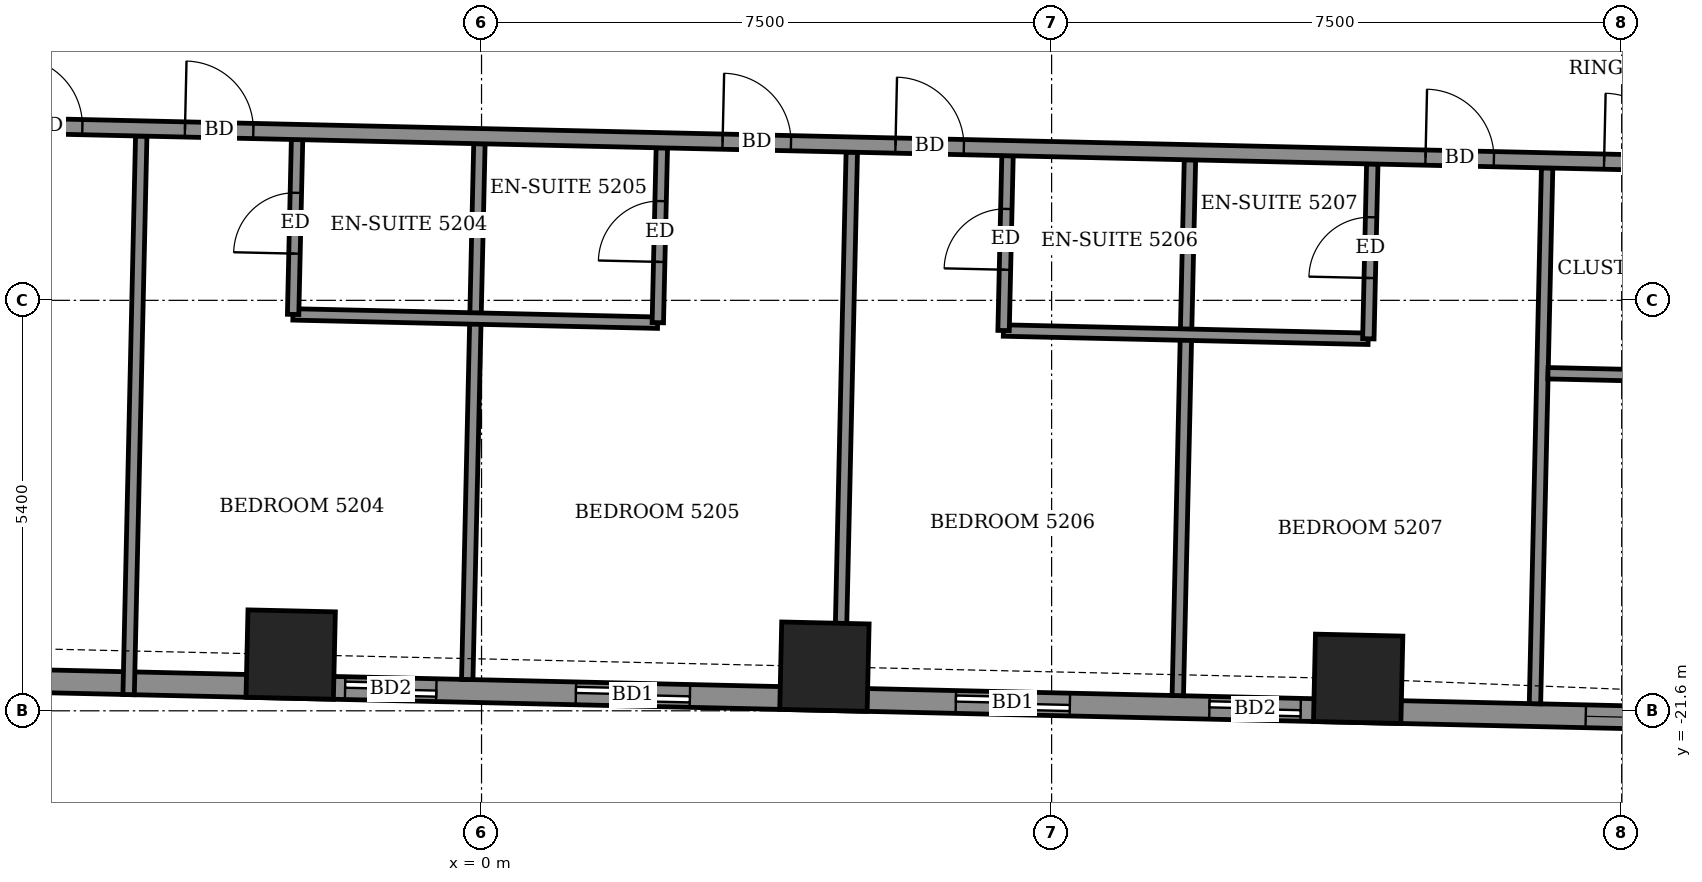
"""IFC4 building model, lengths in metres.
Left out: names, types, materials, properties, quantities, classifications, styles, units other than length and angle.
Written with IfcOpenShell. Run it as: python <this file> out.ifc"""

import sys

from ifc_helpers import new_model, si_unit, direction, frame, frame_2d, origin, origin_2d, place, context, subcontext, project, spatial, rectangle, extrude, element, fill, save


model = new_model("IFC4")
c1 = context("Model", 3, precision=1e-05, world=origin(), true_north=direction((0.0, 1.0)))
c2 = subcontext(c1, "Body", "Model", "MODEL_VIEW")
j1 = project(units=[si_unit("LENGTHUNIT", "METRE"), si_unit("PLANEANGLEUNIT", "RADIAN")], contexts=[c1])
p1 = place(None, origin())
s1 = spatial("IfcSite", under=j1, at=p1, CompositionType="ELEMENT")
p2 = place(p1, origin())
s2 = spatial("IfcBuilding", under=s1, at=p2, CompositionType="ELEMENT")
p3 = place(p2, frame((0.0, 0.0, 205.1)))
s3 = spatial("IfcBuildingStorey", under=s2, at=p3, CompositionType="ELEMENT", Elevation=205.1)
for number, where, z_axis, x_axis in (
    (1, (-2.511, -20.86, -0.55), (0.0, 0.0, 1.0), (1.0, -0.023, 0.0)),
    (2, (4.511, -21.019, -0.55), (0.0, 0.0, 1.0), (1.0, -0.023, 0.0)),
    (3, (11.533, -21.179, -0.55), (0.0, 0.0, 1.0), (1.0, -0.023, 0.0)),
):
    element("IfcColumn", number, at=place(p3, frame(where, z_axis=z_axis, x_axis=x_axis)), inside=s3, PredefinedType="COLUMN", context=c2, shape_type="SweptSolid", body=[
        extrude(rectangle(XDim=1.15, YDim=1.15, at=origin_2d()), origin(), (0.0, 0.0, 1.0), 3.6),
    ])
p4 = place(p3, frame((-23.437, -20.81, 0.0), z_axis=(0.0, 0.0, 1.0), x_axis=(0.999742269115, -0.022702320244, 0.0)))
e4 = element("IfcWall", 4, at=p4, inside=s3, PredefinedType="SOLIDWALL", context=c2, shape_type="SweptSolid", body=[
    extrude(rectangle(XDim=41.844, YDim=0.3, at=frame_2d((20.922, 0.0))), origin(), (0.0, 0.0, 1.0), 2.55),
])
p5 = place(p4, frame((1.899, 0.0, 0.0)))
e5 = element("IfcOpeningElement", 5, at=p5, cuts=e4, PredefinedType="OPENING", context=c2, shape_type="SweptSolid", body=[
    extrude(rectangle(XDim=1.5, YDim=2.4, at=frame_2d((0.75, 1.2))), frame((0.0, 0.16, 0.0), z_axis=(0.0, -1.0, 0.0), x_axis=(1.0, 0.0, 0.0)), (0.0, 0.0, 1.0), 0.32),
])
p6 = place(p4, frame((7.575, 0.0, 0.0)))
e6 = element("IfcOpeningElement", 6, at=p6, cuts=e4, PredefinedType="OPENING", context=c2, shape_type="SweptSolid", body=[
    extrude(rectangle(XDim=1.2, YDim=2.4, at=frame_2d((0.6, 1.2))), frame((0.0, 0.16, 0.0), z_axis=(0.0, -1.0, 0.0), x_axis=(1.0, 0.0, 0.0)), (0.0, 0.0, 1.0), 0.32),
])
p7 = place(p4, frame((10.612, 0.0, 0.0)))
e7 = element("IfcOpeningElement", 7, at=p7, cuts=e4, PredefinedType="OPENING", context=c2, shape_type="SweptSolid", body=[
    extrude(rectangle(XDim=1.5, YDim=2.4, at=frame_2d((0.75, 1.2))), frame((0.0, 0.16, 0.0), z_axis=(0.0, -1.0, 0.0), x_axis=(1.0, 0.0, 0.0)), (0.0, 0.0, 1.0), 0.32),
])
p8 = place(p4, frame((15.762, 0.0, 0.0)))
e8 = element("IfcOpeningElement", 8, at=p8, cuts=e4, PredefinedType="OPENING", context=c2, shape_type="SweptSolid", body=[
    extrude(rectangle(XDim=1.5, YDim=2.4, at=frame_2d((0.75, 1.2))), frame((0.0, 0.16, 0.0), z_axis=(0.0, -1.0, 0.0), x_axis=(1.0, 0.0, 0.0)), (0.0, 0.0, 1.0), 0.32),
])
p9 = place(p4, frame((21.648, 0.0, 0.0)))
e9 = element("IfcOpeningElement", 9, at=p9, cuts=e4, PredefinedType="OPENING", context=c2, shape_type="SweptSolid", body=[
    extrude(rectangle(XDim=1.2, YDim=2.4, at=frame_2d((0.6, 1.2))), frame((0.0, 0.16, 0.0), z_axis=(0.0, -1.0, 0.0), x_axis=(1.0, 0.0, 0.0)), (0.0, 0.0, 1.0), 0.32),
])
p10 = place(p4, frame((24.685, 0.0, 0.0)))
e10 = element("IfcOpeningElement", 10, at=p10, cuts=e4, PredefinedType="OPENING", context=c2, shape_type="SweptSolid", body=[
    extrude(rectangle(XDim=1.5, YDim=2.4, at=frame_2d((0.75, 1.2))), frame((0.0, 0.16, 0.0), z_axis=(0.0, -1.0, 0.0), x_axis=(1.0, 0.0, 0.0)), (0.0, 0.0, 1.0), 0.32),
])
p11 = place(p4, frame((29.685, 0.0, 0.0)))
e11 = element("IfcOpeningElement", 11, at=p11, cuts=e4, PredefinedType="OPENING", context=c2, shape_type="SweptSolid", body=[
    extrude(rectangle(XDim=1.5, YDim=2.4, at=frame_2d((0.75, 1.2))), frame((0.0, 0.16, 0.0), z_axis=(0.0, -1.0, 0.0), x_axis=(1.0, 0.0, 0.0)), (0.0, 0.0, 1.0), 0.32),
])
p12 = place(p4, frame((33.022, 0.0, 0.0)))
e12 = element("IfcOpeningElement", 12, at=p12, cuts=e4, PredefinedType="OPENING", context=c2, shape_type="SweptSolid", body=[
    extrude(rectangle(XDim=1.2, YDim=2.4, at=frame_2d((0.6, 1.2))), frame((0.0, 0.16, 0.0), z_axis=(0.0, -1.0, 0.0), x_axis=(1.0, 0.0, 0.0)), (0.0, 0.0, 1.0), 0.32),
])
p13 = place(p4, frame((37.974, 0.0, 0.9)))
e13 = element("IfcOpeningElement", 13, at=p13, cuts=e4, PredefinedType="OPENING", context=c2, shape_type="SweptSolid", body=[
    extrude(rectangle(XDim=2.4, YDim=1.5, at=frame_2d((1.2, 0.75))), frame((0.0, 0.16, 0.0), z_axis=(0.0, -1.0, 0.0), x_axis=(1.0, 0.0, 0.0)), (0.0, 0.0, 1.0), 0.32),
])
p14 = place(p3, frame((-4.643, -21.387, 0.0), z_axis=(0.0, 0.0, 1.0), x_axis=(0.022587849492, 0.99974486198, 0.0)))
e14 = element("IfcWall", 14, at=p14, inside=s3, PredefinedType="PARTITIONING", context=c2, shape_type="SweptSolid", body=[
    extrude(rectangle(XDim=7.35, YDim=0.15, at=frame_2d((3.675, 0.0))), origin(), (0.0, 0.0, 1.0), 2.55),
])
p15 = place(p3, frame((-0.188, -21.188, 0.0), z_axis=(0.0, 0.0, 1.0), x_axis=(0.022682859663, 0.99974271084, 0.0)))
e15 = element("IfcWall", 15, at=p15, inside=s3, PredefinedType="PARTITIONING", context=c2, shape_type="SweptSolid", body=[
    extrude(rectangle(XDim=7.05, YDim=0.15, at=frame_2d((3.525, 0.0))), origin(), (0.0, 0.0, 1.0), 2.55),
])
p16 = place(p3, frame((4.711, -21.299, 0.0), z_axis=(0.0, 0.0, 1.0), x_axis=(0.022717472124, 0.999741924929, 0.0)))
e16 = element("IfcWall", 16, at=p16, inside=s3, PredefinedType="PARTITIONING", context=c2, shape_type="SweptSolid", body=[
    extrude(rectangle(XDim=7.05, YDim=0.15, at=frame_2d((3.525, 0.0))), origin(), (0.0, 0.0, 1.0), 3.05),
])
p17 = place(p3, frame((9.16, -21.4, 0.0), z_axis=(0.0, 0.0, 1.0), x_axis=(0.022718258661, 0.999741907056, 0.0)))
e17 = element("IfcWall", 17, at=p17, inside=s3, PredefinedType="PARTITIONING", context=c2, shape_type="SweptSolid", body=[
    extrude(rectangle(XDim=7.05, YDim=0.15, at=frame_2d((3.525, 0.0))), origin(), (0.0, 0.0, 1.0), 2.55),
])
p18 = place(p3, frame((13.859, -21.507, 0.0), z_axis=(0.0, 0.0, 1.0), x_axis=(0.022714326521, 0.999741996402, 0.0)))
e18 = element("IfcWall", 18, at=p18, inside=s3, PredefinedType="PARTITIONING", context=c2, shape_type="SweptSolid", body=[
    extrude(rectangle(XDim=7.051, YDim=0.15, at=frame_2d((3.525, 0.0))), origin(), (0.0, 0.0, 1.0), 2.55),
])
p19 = place(p3, frame((14.03, -17.159, 0.0), z_axis=(0.0, 0.0, 1.0), x_axis=(0.999740478815, -0.022781023197, 0.0)))
e19 = element("IfcWall", 19, at=p19, inside=s3, PredefinedType="PARTITIONING", context=c2, shape_type="SweptSolid", body=[
    extrude(rectangle(XDim=2.325, YDim=0.15, at=frame_2d((1.163, 0.0))), origin(), (0.0, 0.0, 1.0), 3.05),
])
p20 = place(p3, frame((-2.481, -16.385, 0.0), z_axis=(0.0, 0.0, 1.0), x_axis=(0.999742570398, -0.022689048768, 0.0)))
e20 = element("IfcWall", 20, at=p20, inside=s3, PredefinedType="PARTITIONING", context=c2, shape_type="SweptSolid", body=[
    extrude(rectangle(XDim=4.799, YDim=0.15, at=frame_2d((2.399, 0.0))), origin(), (0.0, 0.0, 1.0), 3.05),
])
p21 = place(p3, frame((-2.479, -16.385, 0.0), z_axis=(0.0, 0.0, 1.0), x_axis=(0.022603288534, 0.999744513037, 0.0)))
e21 = element("IfcWall", 21, at=p21, inside=s3, PredefinedType="PARTITIONING", context=c2, shape_type="SweptSolid", body=[
    extrude(rectangle(XDim=2.301, YDim=0.15, at=frame_2d((1.15, 0.0))), origin(), (0.0, 0.0, 1.0), 3.05),
])
p22 = place(p21, frame((0.8, 0.0, 0.0)))
e22 = element("IfcOpeningElement", 22, at=p22, cuts=e21, PredefinedType="OPENING", context=c2, shape_type="SweptSolid", body=[
    extrude(rectangle(XDim=0.8, YDim=2.1, at=frame_2d((0.4, 1.05))), frame((0.0, 0.085, 0.0), z_axis=(0.0, -1.0, 0.0), x_axis=(1.0, 0.0, 0.0)), (0.0, 0.0, 1.0), 0.17),
])
p23 = place(p3, frame((2.319, -16.494, 0.0), z_axis=(0.0, 0.0, 1.0), x_axis=(0.023029983665, 0.999734774754, 0.0)))
e23 = element("IfcWall", 23, at=p23, inside=s3, PredefinedType="PARTITIONING", context=c2, shape_type="SweptSolid", body=[
    extrude(rectangle(XDim=2.3, YDim=0.15, at=frame_2d((1.15, 0.0))), origin(), (0.0, 0.0, 1.0), 3.05),
])
p24 = place(p23, frame((0.8, 0.0, 0.0)))
e24 = element("IfcOpeningElement", 24, at=p24, cuts=e23, PredefinedType="OPENING", context=c2, shape_type="SweptSolid", body=[
    extrude(rectangle(XDim=0.8, YDim=2.1, at=frame_2d((0.4, 1.05))), frame((0.0, 0.085, 0.0), z_axis=(0.0, -1.0, 0.0), x_axis=(1.0, 0.0, 0.0)), (0.0, 0.0, 1.0), 0.17),
])
p25 = place(p3, frame((6.866, -16.597, 0.0), z_axis=(0.0, 0.0, 1.0), x_axis=(0.99974154664, -0.022734113616, 0.0)))
e25 = element("IfcWall", 25, at=p25, inside=s3, PredefinedType="PARTITIONING", context=c2, shape_type="SweptSolid", body=[
    extrude(rectangle(XDim=4.8, YDim=0.15, at=frame_2d((2.4, 0.0))), origin(), (0.0, 0.0, 1.0), 3.05),
])
p26 = place(p3, frame((6.868, -16.597, 0.0), z_axis=(0.0, 0.0, 1.0), x_axis=(0.022605686808, 0.999744458811, 0.0)))
e26 = element("IfcWall", 26, at=p26, inside=s3, PredefinedType="PARTITIONING", context=c2, shape_type="SweptSolid", body=[
    extrude(rectangle(XDim=2.3, YDim=0.15, at=frame_2d((1.15, 0.0))), origin(), (0.0, 0.0, 1.0), 3.05),
])
p27 = place(p26, frame((0.8, 0.0, 0.0)))
e27 = element("IfcOpeningElement", 27, at=p27, cuts=e26, PredefinedType="OPENING", context=c2, shape_type="SweptSolid", body=[
    extrude(rectangle(XDim=0.8, YDim=2.1, at=frame_2d((0.4, 1.05))), frame((0.0, 0.085, 0.0), z_axis=(0.0, -1.0, 0.0), x_axis=(1.0, 0.0, 0.0)), (0.0, 0.0, 1.0), 0.17),
])
p28 = place(p3, frame((11.667, -16.706, 0.0), z_axis=(0.0, 0.0, 1.0), x_axis=(0.022603288534, 0.999744513037, 0.0)))
e28 = element("IfcWall", 28, at=p28, inside=s3, PredefinedType="PARTITIONING", context=c2, shape_type="SweptSolid", body=[
    extrude(rectangle(XDim=2.301, YDim=0.15, at=frame_2d((1.15, 0.0))), origin(), (0.0, 0.0, 1.0), 3.05),
])
p29 = place(p28, frame((0.8, 0.0, 0.0)))
e29 = element("IfcOpeningElement", 29, at=p29, cuts=e28, PredefinedType="OPENING", context=c2, shape_type="SweptSolid", body=[
    extrude(rectangle(XDim=0.8, YDim=2.1, at=frame_2d((0.4, 1.05))), frame((0.0, 0.085, 0.0), z_axis=(0.0, -1.0, 0.0), x_axis=(1.0, 0.0, 0.0)), (0.0, 0.0, 1.0), 0.17),
])
p30 = place(p3, frame((-26.421, -13.441, 0.0), z_axis=(0.0, 0.0, 1.0), x_axis=(0.999742754064, -0.022680954485, 0.0)))
e30 = element("IfcWall", 30, at=p30, inside=s3, PredefinedType="PARTITIONING", context=c2, shape_type="SweptSolid", body=[
    extrude(rectangle(XDim=48.945, YDim=0.2, at=frame_2d((24.472, 0.0))), origin(), (0.0, 0.0, 1.0), 3.05),
])
p31 = place(p30, frame((1.375, 0.0, 0.0)))
e31 = element("IfcOpeningElement", 31, at=p31, cuts=e30, PredefinedType="OPENING", context=c2, shape_type="SweptSolid", body=[
    extrude(rectangle(XDim=1.0, YDim=2.1, at=frame_2d((0.5, 1.05))), frame((0.0, 0.11, 0.0), z_axis=(0.0, -1.0, 0.0), x_axis=(1.0, 0.0, 0.0)), (0.0, 0.0, 1.0), 0.22),
])
p32 = place(p30, frame((6.0, 0.0, 0.0)))
e32 = element("IfcOpeningElement", 32, at=p32, cuts=e30, PredefinedType="OPENING", context=c2, shape_type="SweptSolid", body=[
    extrude(rectangle(XDim=0.9, YDim=2.1, at=frame_2d((0.45, 1.05))), frame((0.0, 0.11, 0.0), z_axis=(0.0, -1.0, 0.0), x_axis=(1.0, 0.0, 0.0)), (0.0, 0.0, 1.0), 0.22),
])
p33 = place(p30, frame((10.775, 0.0, 0.0)))
e33 = element("IfcOpeningElement", 33, at=p33, cuts=e30, PredefinedType="OPENING", context=c2, shape_type="SweptSolid", body=[
    extrude(rectangle(XDim=0.9, YDim=2.1, at=frame_2d((0.45, 1.05))), frame((0.0, 0.11, 0.0), z_axis=(0.0, -1.0, 0.0), x_axis=(1.0, 0.0, 0.0)), (0.0, 0.0, 1.0), 0.22),
])
p34 = place(p30, frame((13.05, 0.0, 0.0)))
e34 = element("IfcOpeningElement", 34, at=p34, cuts=e30, PredefinedType="OPENING", context=c2, shape_type="SweptSolid", body=[
    extrude(rectangle(XDim=0.9, YDim=2.1, at=frame_2d((0.45, 1.05))), frame((0.0, 0.11, 0.0), z_axis=(0.0, -1.0, 0.0), x_axis=(1.0, 0.0, 0.0)), (0.0, 0.0, 1.0), 0.22),
])
p35 = place(p30, frame((20.275, 0.0, 0.0)))
e35 = element("IfcOpeningElement", 35, at=p35, cuts=e30, PredefinedType="OPENING", context=c2, shape_type="SweptSolid", body=[
    extrude(rectangle(XDim=0.9, YDim=2.1, at=frame_2d((0.45, 1.05))), frame((0.0, 0.11, 0.0), z_axis=(0.0, -1.0, 0.0), x_axis=(1.0, 0.0, 0.0)), (0.0, 0.0, 1.0), 0.22),
])
p36 = place(p30, frame((22.525, 0.0, 0.0)))
e36 = element("IfcOpeningElement", 36, at=p36, cuts=e30, PredefinedType="OPENING", context=c2, shape_type="SweptSolid", body=[
    extrude(rectangle(XDim=0.9, YDim=2.1, at=frame_2d((0.45, 1.05))), frame((0.0, 0.11, 0.0), z_axis=(0.0, -1.0, 0.0), x_axis=(1.0, 0.0, 0.0)), (0.0, 0.0, 1.0), 0.22),
])
p37 = place(p30, frame((29.6, 0.0, 0.0)))
e37 = element("IfcOpeningElement", 37, at=p37, cuts=e30, PredefinedType="OPENING", context=c2, shape_type="SweptSolid", body=[
    extrude(rectangle(XDim=0.9, YDim=2.1, at=frame_2d((0.45, 1.05))), frame((0.0, 0.11, 0.0), z_axis=(0.0, -1.0, 0.0), x_axis=(1.0, 0.0, 0.0)), (0.0, 0.0, 1.0), 0.22),
])
p38 = place(p30, frame((31.875, 0.0, 0.0)))
e38 = element("IfcOpeningElement", 38, at=p38, cuts=e30, PredefinedType="OPENING", context=c2, shape_type="SweptSolid", body=[
    extrude(rectangle(XDim=0.9, YDim=2.1, at=frame_2d((0.45, 1.05))), frame((0.0, 0.11, 0.0), z_axis=(0.0, -1.0, 0.0), x_axis=(1.0, 0.0, 0.0)), (0.0, 0.0, 1.0), 0.22),
])
p39 = place(p30, frame((38.85, 0.0, 0.0)))
e39 = element("IfcOpeningElement", 39, at=p39, cuts=e30, PredefinedType="OPENING", context=c2, shape_type="SweptSolid", body=[
    extrude(rectangle(XDim=0.9, YDim=2.1, at=frame_2d((0.45, 1.05))), frame((0.0, 0.11, 0.0), z_axis=(0.0, -1.0, 0.0), x_axis=(1.0, 0.0, 0.0)), (0.0, 0.0, 1.0), 0.22),
])
p40 = place(p30, frame((46.097, 0.0, 0.0)))
e40 = element("IfcOpeningElement", 40, at=p40, cuts=e30, PredefinedType="OPENING", context=c2, shape_type="SweptSolid", body=[
    extrude(rectangle(XDim=1.0, YDim=2.1, at=frame_2d((0.5, 1.05))), frame((0.0, 0.11, 0.0), z_axis=(0.0, -1.0, 0.0), x_axis=(1.0, 0.0, 0.0)), (0.0, 0.0, 1.0), 0.22),
])
p41 = place(p30, frame((41.2, 0.0, 0.0)))
e41 = element("IfcOpeningElement", 41, at=p41, cuts=e30, PredefinedType="OPENING", context=c2, shape_type="SweptSolid", body=[
    extrude(rectangle(XDim=0.9, YDim=2.1, at=frame_2d((0.45, 1.05))), frame((0.0, 0.11, 0.0), z_axis=(0.0, -1.0, 0.0), x_axis=(1.0, 0.0, 0.0)), (0.0, 0.0, 1.0), 0.22),
])
p42 = place(p9, origin())
e42 = element("IfcDoor", 42, at=p42, inside=s3, OperationType="SLIDING_TO_LEFT", PredefinedType="DOOR", context=c2, shape_type="SweptSolid", body=[
    extrude(rectangle(XDim=1.2, YDim=2.4, at=frame_2d((0.6, 1.2))), frame((0.0, 0.025, 0.0), z_axis=(0.0, -1.0, 0.0), x_axis=(1.0, 0.0, 0.0)), (0.0, 0.0, 1.0), 0.05),
])
fill(e9, e42)
p43 = place(p10, origin())
e43 = element("IfcDoor", 43, at=p43, inside=s3, OperationType="SLIDING_TO_LEFT", PredefinedType="DOOR", context=c2, shape_type="SweptSolid", body=[
    extrude(rectangle(XDim=1.5, YDim=2.4, at=frame_2d((0.75, 1.2))), frame((0.0, 0.025, 0.0), z_axis=(0.0, -1.0, 0.0), x_axis=(1.0, 0.0, 0.0)), (0.0, 0.0, 1.0), 0.05),
])
fill(e10, e43)
p44 = place(p11, origin())
e44 = element("IfcDoor", 44, at=p44, inside=s3, OperationType="SLIDING_TO_LEFT", PredefinedType="DOOR", context=c2, shape_type="SweptSolid", body=[
    extrude(rectangle(XDim=1.5, YDim=2.4, at=frame_2d((0.75, 1.2))), frame((0.0, 0.025, 0.0), z_axis=(0.0, -1.0, 0.0), x_axis=(1.0, 0.0, 0.0)), (0.0, 0.0, 1.0), 0.05),
])
fill(e11, e44)
p45 = place(p12, origin())
e45 = element("IfcDoor", 45, at=p45, inside=s3, OperationType="SLIDING_TO_LEFT", PredefinedType="DOOR", context=c2, shape_type="SweptSolid", body=[
    extrude(rectangle(XDim=1.2, YDim=2.4, at=frame_2d((0.6, 1.2))), frame((0.0, 0.025, 0.0), z_axis=(0.0, -1.0, 0.0), x_axis=(1.0, 0.0, 0.0)), (0.0, 0.0, 1.0), 0.05),
])
fill(e12, e45)
p46 = place(p13, origin())
e46 = element("IfcWindow", 46, at=p46, inside=s3, PartitioningType="DOUBLE_PANEL_VERTICAL", PredefinedType="WINDOW", context=c2, shape_type="SweptSolid", body=[
    extrude(rectangle(XDim=2.4, YDim=1.5, at=frame_2d((1.2, 0.75))), frame((0.0, 0.03, 0.0), z_axis=(0.0, -1.0, 0.0), x_axis=(1.0, 0.0, 0.0)), (0.0, 0.0, 1.0), 0.06),
])
fill(e13, e46)
p47 = place(p35, origin())
e47 = element("IfcDoor", 47, at=p47, inside=s3, OperationType="SINGLE_SWING_LEFT", PredefinedType="DOOR", context=c2, shape_type="SweptSolid", body=[
    extrude(rectangle(XDim=0.9, YDim=2.1, at=frame_2d((0.45, 1.05))), frame((0.0, 0.025, 0.0), z_axis=(0.0, -1.0, 0.0), x_axis=(1.0, 0.0, 0.0)), (0.0, 0.0, 1.0), 0.05),
])
fill(e35, e47)
p48 = place(p36, origin())
e48 = element("IfcDoor", 48, at=p48, inside=s3, OperationType="SINGLE_SWING_RIGHT", PredefinedType="DOOR", context=c2, shape_type="SweptSolid", body=[
    extrude(rectangle(XDim=0.9, YDim=2.1, at=frame_2d((0.45, 1.05))), frame((0.0, 0.025, 0.0), z_axis=(0.0, -1.0, 0.0), x_axis=(1.0, 0.0, 0.0)), (0.0, 0.0, 1.0), 0.05),
])
fill(e36, e48)
p49 = place(p22, origin())
e49 = element("IfcDoor", 49, at=p49, inside=s3, OperationType="SINGLE_SWING_RIGHT", PredefinedType="DOOR", context=c2, shape_type="SweptSolid", body=[
    extrude(rectangle(XDim=0.8, YDim=2.1, at=frame_2d((0.4, 1.05))), frame((0.0, 0.025, 0.0), z_axis=(0.0, -1.0, 0.0), x_axis=(1.0, 0.0, 0.0)), (0.0, 0.0, 1.0), 0.05),
])
fill(e22, e49)
p50 = place(p37, origin())
e50 = element("IfcDoor", 50, at=p50, inside=s3, OperationType="SINGLE_SWING_LEFT", PredefinedType="DOOR", context=c2, shape_type="SweptSolid", body=[
    extrude(rectangle(XDim=0.9, YDim=2.1, at=frame_2d((0.45, 1.05))), frame((0.0, 0.025, 0.0), z_axis=(0.0, -1.0, 0.0), x_axis=(1.0, 0.0, 0.0)), (0.0, 0.0, 1.0), 0.05),
])
fill(e37, e50)
p51 = place(p24, origin())
e51 = element("IfcDoor", 51, at=p51, inside=s3, OperationType="SINGLE_SWING_LEFT", PredefinedType="DOOR", context=c2, shape_type="SweptSolid", body=[
    extrude(rectangle(XDim=0.8, YDim=2.1, at=frame_2d((0.4, 1.05))), frame((0.0, 0.025, 0.0), z_axis=(0.0, -1.0, 0.0), x_axis=(1.0, 0.0, 0.0)), (0.0, 0.0, 1.0), 0.05),
])
fill(e24, e51)
p52 = place(p38, origin())
e52 = element("IfcDoor", 52, at=p52, inside=s3, OperationType="SINGLE_SWING_RIGHT", PredefinedType="DOOR", context=c2, shape_type="SweptSolid", body=[
    extrude(rectangle(XDim=0.9, YDim=2.1, at=frame_2d((0.45, 1.05))), frame((0.0, 0.025, 0.0), z_axis=(0.0, -1.0, 0.0), x_axis=(1.0, 0.0, 0.0)), (0.0, 0.0, 1.0), 0.05),
])
fill(e38, e52)
p53 = place(p27, origin())
e53 = element("IfcDoor", 53, at=p53, inside=s3, OperationType="SINGLE_SWING_RIGHT", PredefinedType="DOOR", context=c2, shape_type="SweptSolid", body=[
    extrude(rectangle(XDim=0.8, YDim=2.1, at=frame_2d((0.4, 1.05))), frame((0.0, 0.025, 0.0), z_axis=(0.0, -1.0, 0.0), x_axis=(1.0, 0.0, 0.0)), (0.0, 0.0, 1.0), 0.05),
])
fill(e27, e53)
p54 = place(p39, origin())
e54 = element("IfcDoor", 54, at=p54, inside=s3, OperationType="SINGLE_SWING_LEFT", PredefinedType="DOOR", context=c2, shape_type="SweptSolid", body=[
    extrude(rectangle(XDim=0.9, YDim=2.1, at=frame_2d((0.45, 1.05))), frame((0.0, 0.025, 0.0), z_axis=(0.0, -1.0, 0.0), x_axis=(1.0, 0.0, 0.0)), (0.0, 0.0, 1.0), 0.05),
])
fill(e39, e54)
p55 = place(p29, origin())
e55 = element("IfcDoor", 55, at=p55, inside=s3, OperationType="SINGLE_SWING_LEFT", PredefinedType="DOOR", context=c2, shape_type="SweptSolid", body=[
    extrude(rectangle(XDim=0.8, YDim=2.1, at=frame_2d((0.4, 1.05))), frame((0.0, 0.025, 0.0), z_axis=(0.0, -1.0, 0.0), x_axis=(1.0, 0.0, 0.0)), (0.0, 0.0, 1.0), 0.05),
])
fill(e29, e55)
p56 = place(p41, origin())
e56 = element("IfcDoor", 56, at=p56, inside=s3, OperationType="SINGLE_SWING_RIGHT", PredefinedType="DOOR", context=c2, shape_type="SweptSolid", body=[
    extrude(rectangle(XDim=0.9, YDim=2.1, at=frame_2d((0.45, 1.05))), frame((0.0, 0.025, 0.0), z_axis=(0.0, -1.0, 0.0), x_axis=(1.0, 0.0, 0.0)), (0.0, 0.0, 1.0), 0.05),
])
fill(e41, e56)
save(model, sys.argv[1])
